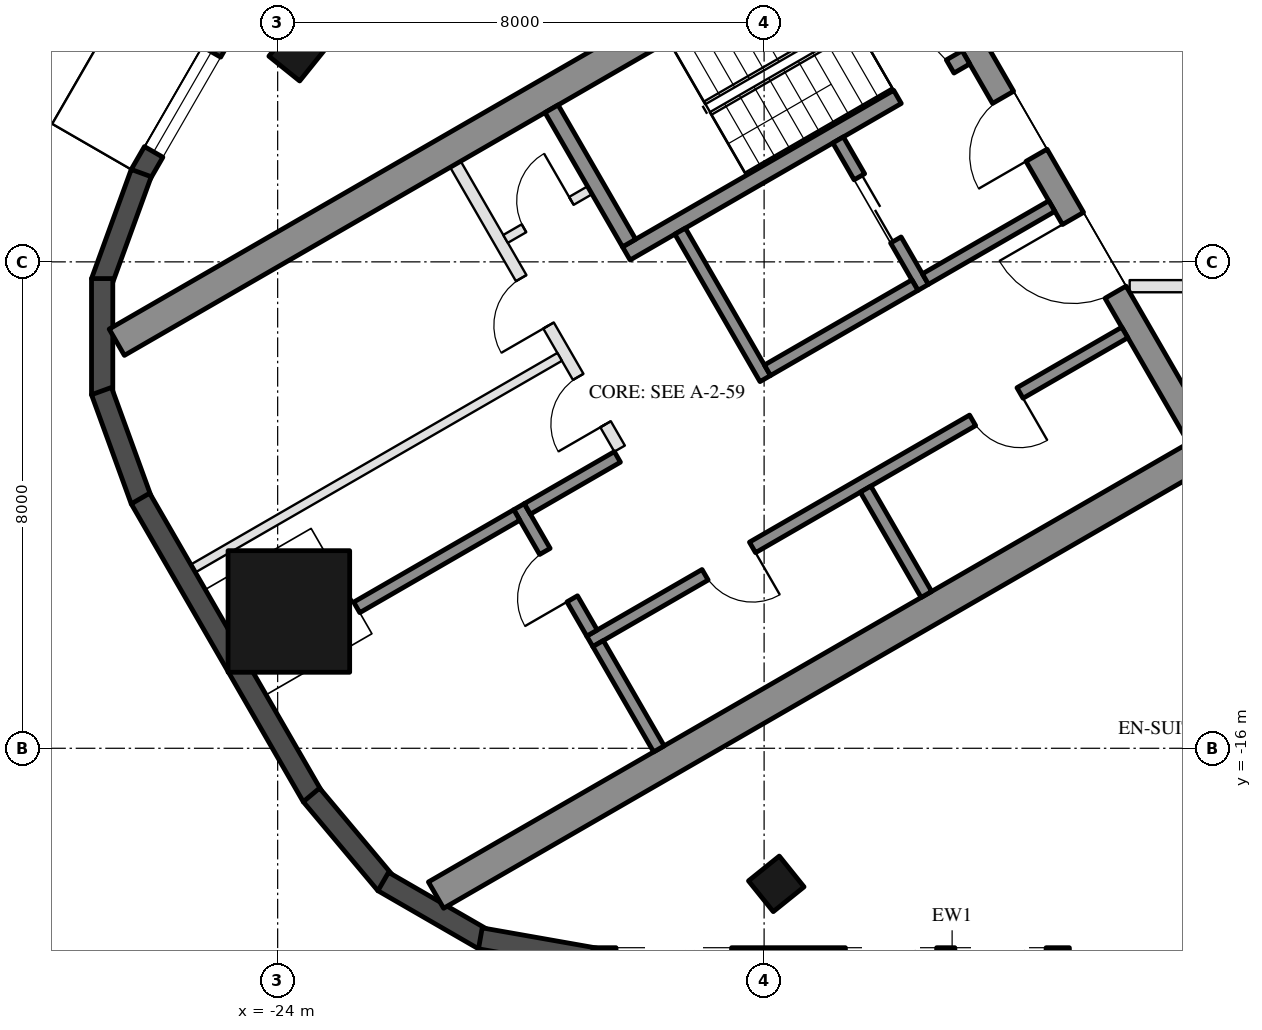
"""IFC4 building model, lengths in metres.
Left out: names, types, materials, properties, quantities, classifications, styles, units other than length and angle.
Written with IfcOpenShell. Run it as: python <this file> out.ifc"""

import sys

from ifc_helpers import new_model, si_unit, direction, frame, frame_2d, origin, origin_2d, place, context, subcontext, project, spatial, rectangle, hollow_rectangle, extrude, boolean, halfspace, element, fill, save


model = new_model("IFC4")
c1 = context("Model", 3, precision=1e-05, world=origin(), true_north=direction((0.0, 1.0)))
c2 = subcontext(c1, "Body", "Model", "MODEL_VIEW")
j1 = project(units=[si_unit("LENGTHUNIT", "METRE"), si_unit("PLANEANGLEUNIT", "RADIAN")], contexts=[c1])
p1 = place(None, origin())
s1 = spatial("IfcSite", under=j1, at=p1, CompositionType="ELEMENT")
p2 = place(p1, origin())
s2 = spatial("IfcBuilding", under=s1, at=p2, CompositionType="ELEMENT")
p3 = place(p2, frame((0.0, 0.0, 254.1)))
s3 = spatial("IfcBuildingStorey", under=s2, at=p3, CompositionType="ELEMENT", Elevation=254.1)
p4 = place(p3, frame((-15.8, -18.23, 0.0), z_axis=(0.121069901949, 0.150398600122, 0.981184151892), x_axis=(-0.992602524484, 0.009308864005, 0.121051945213)))
e1 = element("IfcColumn", 1, at=p4, inside=s3, PredefinedType="COLUMN", context=c2, shape_type="SweptSolid", body=[
    boolean("DIFFERENCE", boolean("DIFFERENCE", extrude(hollow_rectangle(XDim=0.65, YDim=0.65, WallThickness=0.03, at=origin_2d()), origin(), (0.0, 0.0, 1.0), 3.771), halfspace(frame((0.0, 0.0, 0.047), z_axis=(0.0, 0.0, 1.0), x_axis=(1.0, 0.0, 0.0)), True)), halfspace(frame((0.0, 0.0, 3.724), z_axis=(0.0, 0.0, 1.0), x_axis=(1.0, 0.0, 0.0)), False)),
])
p5 = place(p3, frame((-23.688, -4.568, 0.0), z_axis=(0.190735837279, 0.02958801006, 0.981195388309), x_axis=(-0.488489055842, -0.864137452388, 0.121016138189)))
e2 = element("IfcColumn", 2, at=p5, inside=s3, PredefinedType="COLUMN", context=c2, shape_type="SweptSolid", body=[
    boolean("DIFFERENCE", boolean("DIFFERENCE", extrude(hollow_rectangle(XDim=0.65, YDim=0.65, WallThickness=0.03, at=origin_2d()), origin(), (0.0, 0.0, 1.0), 3.771), halfspace(frame((0.0, 0.0, 0.047), z_axis=(0.0, 0.0, 1.0), x_axis=(1.0, 0.0, 0.0)), True)), halfspace(frame((0.0, 0.0, 3.724), z_axis=(0.0, 0.0, 1.0), x_axis=(1.0, 0.0, 0.0)), False)),
])
p6 = place(p3, frame((-23.816, -13.75, 0.0), z_axis=(0.188199890685, 0.108656131275, 0.976101760209), x_axis=(0.499981359081, -0.866036165848, 3.792844e-06)))
e3 = element("IfcColumn", 3, at=p6, inside=s3, PredefinedType="COLUMN", context=c2, shape_type="SweptSolid", body=[
    boolean("DIFFERENCE", boolean("DIFFERENCE", extrude(hollow_rectangle(XDim=2.0, YDim=2.0, WallThickness=0.05, at=origin_2d()), origin(), (0.0, 0.0, 1.0), 3.791), halfspace(frame((0.0, 0.0, 0.112), z_axis=(0.0, 0.0, 1.0), x_axis=(1.0, 0.0, 0.0)), True)), halfspace(frame((0.0, 0.0, 3.678), z_axis=(0.0, 0.0, 1.0), x_axis=(1.0, 0.0, 0.0)), False)),
])
p7 = place(p3, frame((-24.299, -3.176, 0.0), z_axis=(0.0, 0.0, 1.0), x_axis=(-0.500028278809, -0.866009076391, 0.0)))
e4 = element("IfcWall", 4, at=p7, inside=s3, PredefinedType="SOLIDWALL", context=c2, shape_type="SweptSolid", body=[
    extrude(rectangle(XDim=3.916, YDim=0.35, at=frame_2d((1.958, 0.0))), origin(), (0.0, 0.0, 1.0), 3.55),
])
p8 = place(p7, frame((1.581, 0.0, 0.3)))
e5 = element("IfcOpeningElement", 5, at=p8, cuts=e4, PredefinedType="OPENING", context=c2, shape_type="SweptSolid", body=[
    extrude(rectangle(XDim=1.9, YDim=2.65, at=frame_2d((0.95, 1.325))), frame((0.0, 0.185, 0.0), z_axis=(0.0, -1.0, 0.0), x_axis=(1.0, 0.0, 0.0)), (0.0, 0.0, 1.0), 0.37),
])
for number, where, z_axis, x_axis in (
    (6, (-26.244, -6.54, 0.0), (0.0, 0.0, 1.0), (-0.342, -0.94, 0.0)),
    (7, (-26.886, -8.275, 0.0), (0.0, 0.0, 1.0), (0.0, -1.0, 0.0)),
    (8, (-26.897, -10.125, 0.0), (0.0, 0.0, 1.0), (0.342, -0.94, 0.0)),
):
    element("IfcWall", number, at=place(p3, frame(where, z_axis=z_axis, x_axis=x_axis)), inside=s3, PredefinedType="SOLIDWALL", context=c2, shape_type="SweptSolid", body=[
        extrude(rectangle(XDim=1.91, YDim=0.35, at=frame_2d((0.955, 0.0))), origin(), (0.0, 0.0, 1.0), 3.55),
    ])
p9 = place(p3, frame((-26.257, -11.893, 0.0), z_axis=(0.0, 0.0, 1.0), x_axis=(0.500018773155, -0.866014564827, 0.0)))
e9 = element("IfcWall", 9, at=p9, inside=s3, PredefinedType="SOLIDWALL", context=c2, shape_type="SweptSolid", body=[
    extrude(rectangle(XDim=5.658, YDim=0.35, at=frame_2d((2.829, 0.0))), origin(), (0.0, 0.0, 1.0), 3.55),
])
for number, where, z_axis, x_axis in (
    (10, (-23.445, -16.768, 0.0), (0.0, 0.0, 1.0), (0.643, -0.766, 0.0)),
    (11, (-22.264, -18.192, 0.0), (0.0, 0.0, 1.0), (0.866, -0.5, 0.0)),
):
    element("IfcWall", number, at=place(p3, frame(where, z_axis=z_axis, x_axis=x_axis)), inside=s3, PredefinedType="SOLIDWALL", context=c2, shape_type="SweptSolid", body=[
        extrude(rectangle(XDim=1.91, YDim=0.35, at=frame_2d((0.955, 0.0))), origin(), (0.0, 0.0, 1.0), 3.55),
    ])
p10 = place(p3, frame((-20.667, -19.126, 0.0), z_axis=(0.0, 0.0, 1.0), x_axis=(0.984798995425, -0.173697837091, 0.0)))
e12 = element("IfcWall", 12, at=p10, inside=s3, PredefinedType="SOLIDWALL", context=c2, shape_type="SweptSolid", body=[
    extrude(rectangle(XDim=1.91, YDim=0.35, at=frame_2d((0.955, 0.0))), origin(), (0.0, 0.0, 1.0), 3.55),
])
p11 = place(p3, frame((-18.816, -19.455, 0.0), z_axis=(0.0, 0.0, 1.0), x_axis=(1.0, 0.0, 0.0)))
e13 = element("IfcWall", 13, at=p11, inside=s3, PredefinedType="SOLIDWALL", context=c2, shape_type="SweptSolid", body=[
    extrude(rectangle(XDim=11.816, YDim=0.35, at=frame_2d((5.908, 0.0))), origin(), (0.0, 0.0, 1.0), 3.55),
])
p12 = place(p11, frame((0.381, 0.0, 0.3)))
e14 = element("IfcOpeningElement", 14, at=p12, cuts=e13, PredefinedType="OPENING", context=c2, shape_type="SweptSolid", body=[
    extrude(rectangle(XDim=1.9, YDim=2.65, at=frame_2d((0.95, 1.325))), frame((0.0, 0.185, 0.0), z_axis=(0.0, -1.0, 0.0), x_axis=(1.0, 0.0, 0.0)), (0.0, 0.0, 1.0), 0.37),
])
p13 = place(p11, frame((7.836, 0.0, 0.0)))
e15 = element("IfcOpeningElement", 15, at=p13, cuts=e13, PredefinedType="OPENING", context=c2, shape_type="SweptSolid", body=[
    extrude(rectangle(XDim=2.4, YDim=2.4, at=frame_2d((1.2, 1.2))), frame((0.0, 0.185, 0.0), z_axis=(0.0, -1.0, 0.0), x_axis=(1.0, 0.0, 0.0)), (0.0, 0.0, 1.0), 0.37),
])
p14 = place(p11, frame((4.153, 0.0, 0.3)))
e16 = element("IfcOpeningElement", 16, at=p14, cuts=e13, PredefinedType="OPENING", context=c2, shape_type="SweptSolid", body=[
    extrude(rectangle(XDim=1.5, YDim=2.65, at=frame_2d((0.75, 1.325))), frame((0.0, 0.185, 0.0), z_axis=(0.0, -1.0, 0.0), x_axis=(1.0, 0.0, 0.0)), (0.0, 0.0, 1.0), 0.37),
])
p15 = place(p11, frame((5.953, 0.0, 0.3)))
e17 = element("IfcOpeningElement", 17, at=p15, cuts=e13, PredefinedType="OPENING", context=c2, shape_type="SweptSolid", body=[
    extrude(rectangle(XDim=1.5, YDim=2.65, at=frame_2d((0.75, 1.325))), frame((0.0, 0.185, 0.0), z_axis=(0.0, -1.0, 0.0), x_axis=(1.0, 0.0, 0.0)), (0.0, 0.0, 1.0), 0.37),
])
for number, where, z_axis, x_axis in (
    (18, (-13.797, -1.903, 0.0), (0.0, 0.0, 1.0), (-0.866, -0.5, 0.0)),
    (19, (-8.547, -10.997, 0.0), (0.0, 0.0, 1.0), (-0.866, -0.5, 0.0)),
):
    element("IfcWall", number, at=place(p3, frame(where, z_axis=z_axis, x_axis=x_axis)), inside=s3, PredefinedType="SHEAR", context=c2, shape_type="SweptSolid", body=[
        extrude(rectangle(XDim=14.837, YDim=0.5, at=frame_2d((7.418, 0.0))), origin(), (0.0, 0.0, 1.0), 3.5),
    ])
p16 = place(p3, frame((-13.845, -2.22, 0.0), z_axis=(0.0, 0.0, 1.0), x_axis=(0.500004234368, -0.866022959057, 0.0)))
e20 = element("IfcWall", 20, at=p16, inside=s3, PredefinedType="SHEAR", context=c2, shape_type="SweptSolid", body=[
    extrude(rectangle(XDim=10.0, YDim=0.4, at=frame_2d((5.0, 0.0))), origin(), (0.0, 0.0, 1.0), 3.5),
])
p17 = place(p16, frame((3.55, 0.0, 0.0)))
e21 = element("IfcOpeningElement", 21, at=p17, cuts=e20, PredefinedType="OPENING", context=c2, shape_type="SweptSolid", body=[
    extrude(rectangle(XDim=1.1, YDim=2.1, at=frame_2d((0.55, 1.05))), frame((0.0, 0.21, 0.0), z_axis=(0.0, -1.0, 0.0), x_axis=(1.0, 0.0, 0.0)), (0.0, 0.0, 1.0), 0.42),
])
p18 = place(p16, frame((5.85, 0.0, 0.0)))
e22 = element("IfcOpeningElement", 22, at=p18, cuts=e20, PredefinedType="OPENING", context=c2, shape_type="SweptSolid", body=[
    extrude(rectangle(XDim=1.4, YDim=2.1, at=frame_2d((0.7, 1.05))), frame((0.0, 0.21, 0.0), z_axis=(0.0, -1.0, 0.0), x_axis=(1.0, 0.0, 0.0)), (0.0, 0.0, 1.0), 0.42),
])
p19 = place(p3, frame((-12.681, -4.636, 0.0), z_axis=(0.0, 0.0, 1.0), x_axis=(-0.866021702275, -0.500006411147, 0.0)))
e23 = element("IfcWall", 23, at=p19, inside=s3, PredefinedType="SHEAR", context=c2, shape_type="SweptSolid", body=[
    extrude(rectangle(XDim=6.45, YDim=0.25, at=frame_2d((3.225, 0.0))), origin(), (0.0, 0.0, 1.0), 3.5),
])
p20 = place(p19, frame((0.3, 0.0, 0.0)))
e24 = element("IfcOpeningElement", 24, at=p20, cuts=e23, PredefinedType="OPENING", context=c2, shape_type="SweptSolid", body=[
    extrude(rectangle(XDim=1.0, YDim=2.1, at=frame_2d((0.5, 1.05))), frame((0.0, 0.135, 0.0), z_axis=(0.0, -1.0, 0.0), x_axis=(1.0, 0.0, 0.0)), (0.0, 0.0, 1.0), 0.27),
])
p21 = place(p3, frame((-19.496, -5.482, 0.0), z_axis=(0.0, 0.0, 1.0), x_axis=(0.499990435942, -0.866030925526, 0.0)))
e25 = element("IfcWall", 25, at=p21, inside=s3, PredefinedType="SHEAR", context=c2, shape_type="SweptSolid", body=[
    extrude(rectangle(XDim=2.55, YDim=0.25, at=frame_2d((1.275, 0.0))), origin(), (0.0, 0.0, 1.0), 3.5),
])
p22 = place(p3, frame((-17.381, -7.495, 0.0), z_axis=(0.0, 0.0, 1.0), x_axis=(0.500011755427, -0.866018616679, 0.0)))
e26 = element("IfcWall", 26, at=p22, inside=s3, PredefinedType="SHEAR", context=c2, shape_type="SweptSolid", body=[
    extrude(rectangle(XDim=2.8, YDim=0.2, at=frame_2d((1.4, 0.0))), origin(), (0.0, 0.0, 1.0), 3.5),
])
p23 = place(p3, frame((-14.783, -5.995, 0.0), z_axis=(0.0, 0.0, 1.0), x_axis=(0.49994636267, -0.866056369097, 0.0)))
e27 = element("IfcWall", 27, at=p23, inside=s3, PredefinedType="SHEAR", context=c2, shape_type="SweptSolid", body=[
    extrude(rectangle(XDim=2.8, YDim=0.2, at=frame_2d((1.4, 0.0))), origin(), (0.0, 0.0, 1.0), 3.5),
])
p24 = place(p23, frame((0.7, 0.0, 0.0)))
e28 = element("IfcOpeningElement", 28, at=p24, cuts=e27, PredefinedType="OPENING", context=c2, shape_type="SweptSolid", body=[
    extrude(rectangle(XDim=1.2, YDim=2.1, at=frame_2d((0.6, 1.05))), frame((0.0, 0.11, 0.0), z_axis=(0.0, -1.0, 0.0), x_axis=(1.0, 0.0, 0.0)), (0.0, 0.0, 1.0), 0.22),
])
p25 = place(p3, frame((-13.52, -8.383, 0.0), z_axis=(0.0, 0.0, 1.0), x_axis=(-0.866034573852, -0.49998411664, 0.0)))
e29 = element("IfcWall", 29, at=p25, inside=s3, PredefinedType="SHEAR", context=c2, shape_type="SweptSolid", body=[
    extrude(rectangle(XDim=2.8, YDim=0.2, at=frame_2d((1.4, 0.0))), origin(), (0.0, 0.0, 1.0), 3.5),
])
p26 = place(p3, frame((-11.268, -7.083, 0.0), z_axis=(0.0, 0.0, 1.0), x_axis=(-0.866050077142, -0.499957262057, 0.0)))
e30 = element("IfcWall", 30, at=p26, inside=s3, PredefinedType="SHEAR", context=c2, shape_type="SweptSolid", body=[
    extrude(rectangle(XDim=2.4, YDim=0.2, at=frame_2d((1.2, 0.0))), origin(), (0.0, 0.0, 1.0), 3.5),
])
p27 = place(p3, frame((-10.068, -9.162, 0.0), z_axis=(0.0, 0.0, 1.0), x_axis=(-0.866032725843, -0.499987317609, 0.0)))
e31 = element("IfcWall", 31, at=p27, inside=s3, PredefinedType="SHEAR", context=c2, shape_type="SweptSolid", body=[
    extrude(rectangle(XDim=10.16, YDim=0.2, at=frame_2d((5.08, 0.0))), origin(), (0.0, 0.0, 1.0), 3.5),
])
p28 = place(p27, frame((1.99, 0.0, 0.0)))
e32 = element("IfcOpeningElement", 32, at=p28, cuts=e31, PredefinedType="OPENING", context=c2, shape_type="SweptSolid", body=[
    extrude(rectangle(XDim=0.9, YDim=2.1, at=frame_2d((0.45, 1.05))), frame((0.0, 0.11, 0.0), z_axis=(0.0, -1.0, 0.0), x_axis=(1.0, 0.0, 0.0)), (0.0, 0.0, 1.0), 0.22),
])
p29 = place(p27, frame((7.07, 0.0, 0.0)))
e33 = element("IfcOpeningElement", 33, at=p29, cuts=e31, PredefinedType="OPENING", context=c2, shape_type="SweptSolid", body=[
    extrude(rectangle(XDim=0.9, YDim=2.1, at=frame_2d((0.45, 1.05))), frame((0.0, 0.11, 0.0), z_axis=(0.0, -1.0, 0.0), x_axis=(1.0, 0.0, 0.0)), (0.0, 0.0, 1.0), 0.22),
])
p30 = place(p3, frame((-20.031, -12.026, 0.0), z_axis=(0.0, 0.0, 1.0), x_axis=(0.500033551112, -0.866006032174, 0.0)))
e34 = element("IfcWall", 34, at=p30, inside=s3, PredefinedType="SHEAR", context=c2, shape_type="SweptSolid", body=[
    extrude(rectangle(XDim=2.4, YDim=0.2, at=frame_2d((1.2, 0.0))), origin(), (0.0, 0.0, 1.0), 3.5),
])
p31 = place(p30, frame((0.85, 0.0, 0.0)))
e35 = element("IfcOpeningElement", 35, at=p31, cuts=e34, PredefinedType="OPENING", context=c2, shape_type="SweptSolid", body=[
    extrude(rectangle(XDim=0.9, YDim=2.1, at=frame_2d((0.45, 1.05))), frame((0.0, 0.11, 0.0), z_axis=(0.0, -1.0, 0.0), x_axis=(1.0, 0.0, 0.0)), (0.0, 0.0, 1.0), 0.22),
])
p32 = place(p3, frame((-18.413, -11.208, 0.0), z_axis=(0.0, 0.0, 1.0), x_axis=(-0.866038183914, -0.499977863513, 0.0)))
e36 = element("IfcWall", 36, at=p32, inside=s3, PredefinedType="SHEAR", context=c2, shape_type="SweptSolid", body=[
    extrude(rectangle(XDim=1.71, YDim=0.2, at=frame_2d((0.855, 0.0))), origin(), (0.0, 0.0, 1.0), 3.5),
])
for number, where, z_axis, x_axis in (
    (37, (-14.331, -11.738, 0.0), (0.0, 0.0, 1.0), (0.5, -0.866, 0.0)),
    (38, (-18.73, -14.278, 0.0), (0.0, 0.0, 1.0), (0.5, -0.866, 0.0)),
):
    element("IfcWall", number, at=place(p3, frame(where, z_axis=z_axis, x_axis=x_axis)), inside=s3, PredefinedType="SHEAR", context=c2, shape_type="SweptSolid", body=[
        extrude(rectangle(XDim=2.0, YDim=0.2, at=frame_2d((1.0, 0.0))), origin(), (0.0, 0.0, 1.0), 3.5),
    ])
p33 = place(p3, frame((-20.067, -12.163, 0.0), z_axis=(0.0, 0.0, 1.0), x_axis=(-0.866030456496, -0.499991248344, 0.0)))
e39 = element("IfcWall", 39, at=p33, inside=s3, PredefinedType="SHEAR", context=c2, shape_type="SweptSolid", body=[
    extrude(rectangle(XDim=3.04, YDim=0.2, at=frame_2d((1.52, 0.0))), origin(), (0.0, 0.0, 1.0), 3.5),
])
p34 = place(p3, frame((-21.076, -6.395, 0.0), z_axis=(0.0, 0.0, 1.0), x_axis=(0.50001468107, -0.866016927499, 0.0)))
e40 = element("IfcWall", 40, at=p34, inside=s3, PredefinedType="PARTITIONING", context=c2, shape_type="SweptSolid", body=[
    extrude(rectangle(XDim=5.4, YDim=0.2, at=frame_2d((2.7, 0.0))), origin(), (0.0, 0.0, 1.0), 3.5),
])
p35 = place(p34, frame((2.163, 0.0, 0.0)))
e41 = element("IfcOpeningElement", 41, at=p35, cuts=e40, PredefinedType="OPENING", context=c2, shape_type="SweptSolid", body=[
    extrude(rectangle(XDim=0.9, YDim=2.1, at=frame_2d((0.45, 1.05))), frame((0.0, 0.11, 0.0), z_axis=(0.0, -1.0, 0.0), x_axis=(1.0, 0.0, 0.0)), (0.0, 0.0, 1.0), 0.22),
])
p36 = place(p34, frame((4.038, 0.0, 0.0)))
e42 = element("IfcOpeningElement", 42, at=p36, cuts=e40, PredefinedType="OPENING", context=c2, shape_type="SweptSolid", body=[
    extrude(rectangle(XDim=0.9, YDim=2.1, at=frame_2d((0.45, 1.05))), frame((0.0, 0.11, 0.0), z_axis=(0.0, -1.0, 0.0), x_axis=(1.0, 0.0, 0.0)), (0.0, 0.0, 1.0), 0.22),
])
p37 = place(p3, frame((-18.866, -6.822, 0.0), z_axis=(0.0, 0.0, 1.0), x_axis=(-0.866028054938, -0.499995408039, 0.0)))
e43 = element("IfcWall", 43, at=p37, inside=s3, PredefinedType="PARTITIONING", context=c2, shape_type="SweptSolid", body=[
    extrude(rectangle(XDim=1.6, YDim=0.15, at=frame_2d((0.8, 0.0))), origin(), (0.0, 0.0, 1.0), 3.5),
])
p38 = place(p37, frame((0.35, 0.0, 0.0)))
e44 = element("IfcOpeningElement", 44, at=p38, cuts=e43, PredefinedType="OPENING", context=c2, shape_type="SweptSolid", body=[
    extrude(rectangle(XDim=0.9, YDim=2.1, at=frame_2d((0.45, 1.05))), frame((0.0, 0.085, 0.0), z_axis=(0.0, -1.0, 0.0), x_axis=(1.0, 0.0, 0.0)), (0.0, 0.0, 1.0), 0.17),
])
p39 = place(p3, frame((-19.363, -9.562, 0.0), z_axis=(0.0, 0.0, 1.0), x_axis=(-0.866016523273, -0.500015381182, 0.0)))
e45 = element("IfcWall", 45, at=p39, inside=s3, PredefinedType="PARTITIONING", context=c2, shape_type="SweptSolid", body=[
    extrude(rectangle(XDim=6.95, YDim=0.15, at=frame_2d((3.475, 0.0))), origin(), (0.0, 0.0, 1.0), 3.5),
])
p40 = place(p3, frame((-6.206, -8.4, 0.0), z_axis=(0.0, 0.0, 1.0), x_axis=(-1.0, 0.0, 0.0)))
e46 = element("IfcWall", 46, at=p40, inside=s3, PredefinedType="PARTITIONING", context=c2, shape_type="SweptSolid", body=[
    extrude(rectangle(XDim=3.782, YDim=0.2, at=frame_2d((1.891, 0.0))), origin(), (0.0, 0.0, 1.0), 3.0),
])
p41 = place(p40, frame((1.391, 0.0, 0.0)))
e47 = element("IfcOpeningElement", 47, at=p41, cuts=e46, PredefinedType="OPENING", context=c2, shape_type="SweptSolid", body=[
    extrude(rectangle(XDim=1.0, YDim=2.1, at=frame_2d((0.5, 1.05))), frame((0.0, 0.11, 0.0), z_axis=(0.0, -1.0, 0.0), x_axis=(1.0, 0.0, 0.0)), (0.0, 0.0, 1.0), 0.22),
])
p42 = place(p8, origin())
e48 = element("IfcWindow", 48, at=p42, inside=s3, PartitioningType="SINGLE_PANEL", PredefinedType="WINDOW", context=c2, shape_type="SweptSolid", body=[
    extrude(rectangle(XDim=1.9, YDim=2.65, at=frame_2d((0.95, 1.325))), frame((0.0, 0.03, 0.0), z_axis=(0.0, -1.0, 0.0), x_axis=(1.0, 0.0, 0.0)), (0.0, 0.0, 1.0), 0.06),
])
fill(e5, e48)
p43 = place(p24, origin())
e49 = element("IfcDoor", 49, at=p43, inside=s3, OperationType="DOUBLE_DOOR_SLIDING", PredefinedType="DOOR", context=c2, shape_type="SweptSolid", body=[
    extrude(rectangle(XDim=1.2, YDim=2.1, at=frame_2d((0.6, 1.05))), frame((0.0, 0.025, 0.0), z_axis=(0.0, -1.0, 0.0), x_axis=(1.0, 0.0, 0.0)), (0.0, 0.0, 1.0), 0.05),
])
fill(e28, e49)
p44 = place(p38, frame((0.9, 0.0, 0.0), z_axis=(0.0, 0.0, 1.0), x_axis=(-1.0, 0.0, 0.0)))
e50 = element("IfcDoor", 50, at=p44, inside=s3, OperationType="SINGLE_SWING_RIGHT", PredefinedType="DOOR", context=c2, shape_type="SweptSolid", body=[
    extrude(rectangle(XDim=0.9, YDim=2.1, at=frame_2d((0.45, 1.05))), frame((0.0, 0.025, 0.0), z_axis=(0.0, -1.0, 0.0), x_axis=(1.0, 0.0, 0.0)), (0.0, 0.0, 1.0), 0.05),
])
fill(e44, e50)
p45 = place(p28, origin())
e51 = element("IfcDoor", 51, at=p45, inside=s3, OperationType="SINGLE_SWING_LEFT", PredefinedType="DOOR", context=c2, shape_type="SweptSolid", body=[
    extrude(rectangle(XDim=0.9, YDim=2.1, at=frame_2d((0.45, 1.05))), frame((0.0, 0.025, 0.0), z_axis=(0.0, -1.0, 0.0), x_axis=(1.0, 0.0, 0.0)), (0.0, 0.0, 1.0), 0.05),
])
fill(e32, e51)
p46 = place(p29, origin())
e52 = element("IfcDoor", 52, at=p46, inside=s3, OperationType="SINGLE_SWING_LEFT", PredefinedType="DOOR", context=c2, shape_type="SweptSolid", body=[
    extrude(rectangle(XDim=0.9, YDim=2.1, at=frame_2d((0.45, 1.05))), frame((0.0, 0.025, 0.0), z_axis=(0.0, -1.0, 0.0), x_axis=(1.0, 0.0, 0.0)), (0.0, 0.0, 1.0), 0.05),
])
fill(e33, e52)
p47 = place(p31, frame((0.9, 0.0, 0.0), z_axis=(0.0, 0.0, 1.0), x_axis=(-1.0, 0.0, 0.0)))
e53 = element("IfcDoor", 53, at=p47, inside=s3, OperationType="SINGLE_SWING_LEFT", PredefinedType="DOOR", context=c2, shape_type="SweptSolid", body=[
    extrude(rectangle(XDim=0.9, YDim=2.1, at=frame_2d((0.45, 1.05))), frame((0.0, 0.025, 0.0), z_axis=(0.0, -1.0, 0.0), x_axis=(1.0, 0.0, 0.0)), (0.0, 0.0, 1.0), 0.05),
])
fill(e35, e53)
p48 = place(p35, frame((0.9, 0.0, 0.0), z_axis=(0.0, 0.0, 1.0), x_axis=(-1.0, 0.0, 0.0)))
e54 = element("IfcDoor", 54, at=p48, inside=s3, OperationType="SINGLE_SWING_LEFT", PredefinedType="DOOR", context=c2, shape_type="SweptSolid", body=[
    extrude(rectangle(XDim=0.9, YDim=2.1, at=frame_2d((0.45, 1.05))), frame((0.0, 0.025, 0.0), z_axis=(0.0, -1.0, 0.0), x_axis=(1.0, 0.0, 0.0)), (0.0, 0.0, 1.0), 0.05),
])
fill(e41, e54)
p49 = place(p36, frame((0.9, 0.0, 0.0), z_axis=(0.0, 0.0, 1.0), x_axis=(-1.0, 0.0, 0.0)))
e55 = element("IfcDoor", 55, at=p49, inside=s3, OperationType="SINGLE_SWING_LEFT", PredefinedType="DOOR", context=c2, shape_type="SweptSolid", body=[
    extrude(rectangle(XDim=0.9, YDim=2.1, at=frame_2d((0.45, 1.05))), frame((0.0, 0.025, 0.0), z_axis=(0.0, -1.0, 0.0), x_axis=(1.0, 0.0, 0.0)), (0.0, 0.0, 1.0), 0.05),
])
fill(e42, e55)
p50 = place(p17, frame((1.1, 0.0, 0.0), z_axis=(0.0, 0.0, 1.0), x_axis=(-1.0, 0.0, 0.0)))
e56 = element("IfcDoor", 56, at=p50, inside=s3, OperationType="SINGLE_SWING_LEFT", PredefinedType="DOOR", context=c2, shape_type="SweptSolid", body=[
    extrude(rectangle(XDim=1.1, YDim=2.1, at=frame_2d((0.55, 1.05))), frame((0.0, 0.025, 0.0), z_axis=(0.0, -1.0, 0.0), x_axis=(1.0, 0.0, 0.0)), (0.0, 0.0, 1.0), 0.05),
])
fill(e21, e56)
p51 = place(p18, frame((1.4, 0.0, 0.0), z_axis=(0.0, 0.0, 1.0), x_axis=(-1.0, 0.0, 0.0)))
e57 = element("IfcDoor", 57, at=p51, inside=s3, OperationType="DOUBLE_DOOR_SINGLE_SWING", PredefinedType="DOOR", context=c2, shape_type="SweptSolid", body=[
    extrude(rectangle(XDim=1.4, YDim=2.1, at=frame_2d((0.7, 1.05))), frame((0.0, 0.025, 0.0), z_axis=(0.0, -1.0, 0.0), x_axis=(1.0, 0.0, 0.0)), (0.0, 0.0, 1.0), 0.05),
])
fill(e22, e57)
p52 = place(p20, frame((1.0, 0.0, 0.0), z_axis=(0.0, 0.0, 1.0), x_axis=(-1.0, 0.0, 0.0)))
e58 = element("IfcDoor", 58, at=p52, inside=s3, OperationType="SINGLE_SWING_LEFT", PredefinedType="DOOR", context=c2, shape_type="SweptSolid", body=[
    extrude(rectangle(XDim=1.0, YDim=2.1, at=frame_2d((0.5, 1.05))), frame((0.0, 0.025, 0.0), z_axis=(0.0, -1.0, 0.0), x_axis=(1.0, 0.0, 0.0)), (0.0, 0.0, 1.0), 0.05),
])
fill(e24, e58)
save(model, sys.argv[1])
